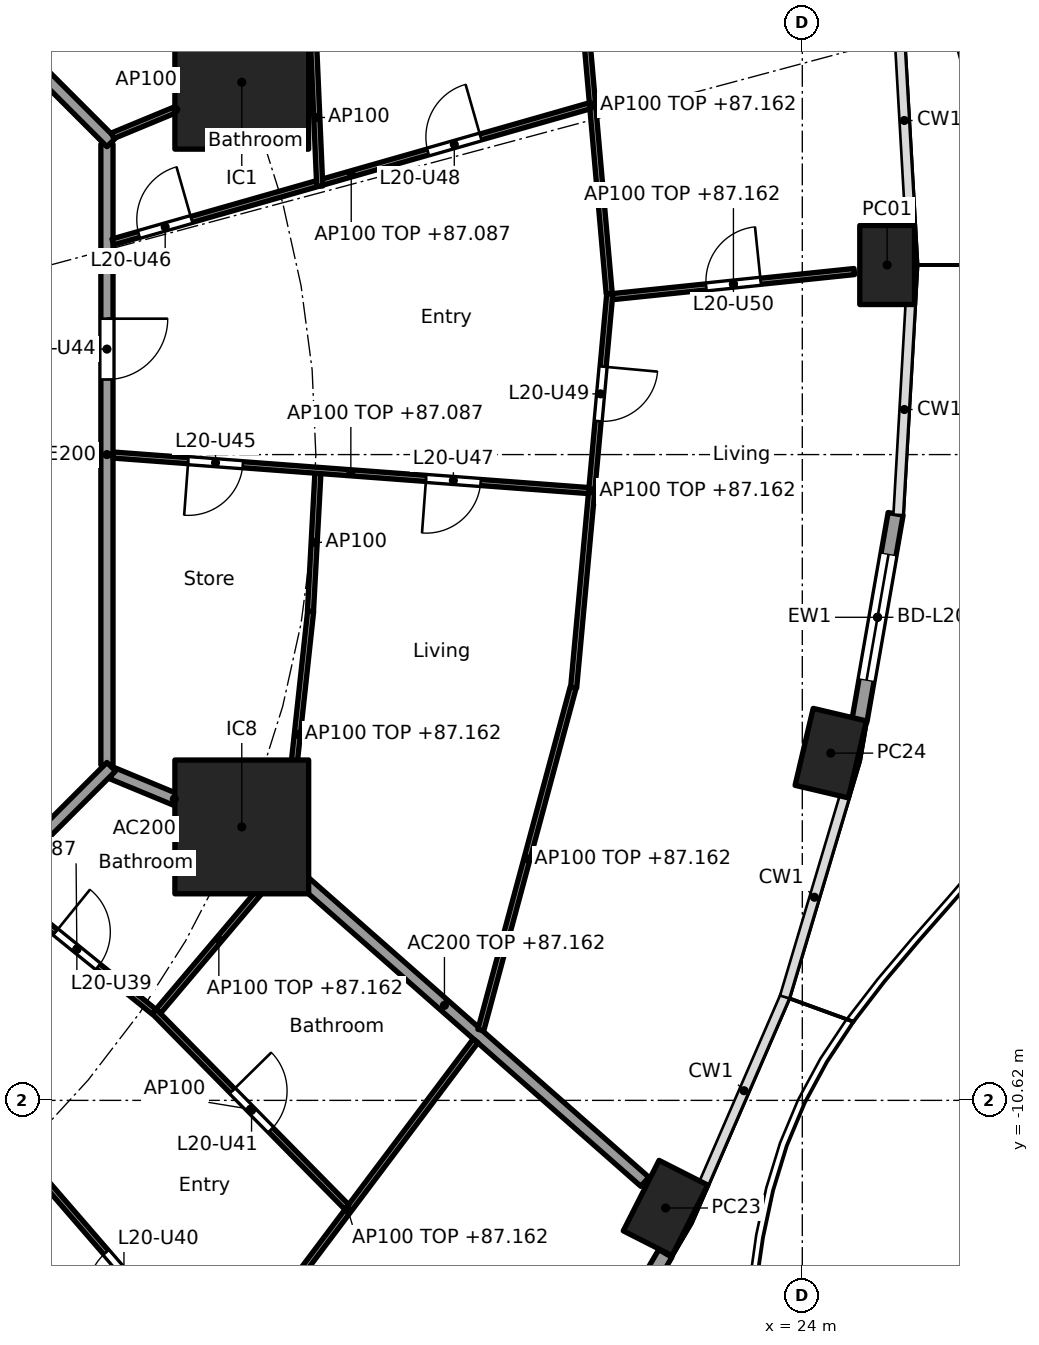
"""IFC4 building model, lengths in metres.
Left out: names, types, materials, properties, quantities, classifications, styles, units other than length and angle.
Written with IfcOpenShell. Run it as: python <this file> out.ifc"""

import sys

from ifc_helpers import new_model, si_unit, direction, frame, frame_2d, origin, origin_2d, place, context, subcontext, project, spatial, rectangle, hollow_rectangle, extrude, element, fill, save


model = new_model("IFC4")
c1 = context("Model", 3, precision=1e-05, world=origin(), true_north=direction((0.0, 1.0)))
c2 = subcontext(c1, "Body", "Model", "MODEL_VIEW")
j1 = project(units=[si_unit("LENGTHUNIT", "METRE"), si_unit("PLANEANGLEUNIT", "RADIAN")], contexts=[c1])
p1 = place(None, origin())
s1 = spatial("IfcSite", under=j1, at=p1, CompositionType="ELEMENT")
p2 = place(p1, origin())
s2 = spatial("IfcBuilding", under=s1, at=p2, CompositionType="ELEMENT")
p3 = place(p2, frame((0.0, 0.0, 84.4)))
s3 = spatial("IfcBuildingStorey", under=s2, at=p3, CompositionType="ELEMENT", Elevation=84.4)
for number, where, z_axis, x_axis in (
    (1, (25.395, 3.118, 0.0), (0.0, 0.0, 1.0), (0.0, 1.0, 0.0)),
    (2, (21.751, -12.39, 0.0), (0.0, 0.0, 1.0), (0.452, 0.892, 0.0)),
    (3, (24.468, -4.91, 0.0), (0.0, 0.0, 1.0), (0.229, 0.973, 0.0)),
):
    element("IfcColumn", number, at=place(p3, frame(where, z_axis=z_axis, x_axis=x_axis)), inside=s3, PredefinedType="COLUMN", context=c2, shape_type="SweptSolid", body=[
        extrude(hollow_rectangle(XDim=1.3, YDim=0.9, WallThickness=0.045, at=origin_2d()), origin(), (0.0, 0.0, 1.0), 3.7),
    ])
for number, where, z_axis, x_axis in (
    (4, (14.782, 6.123, 0.0), (0.0, 0.0, 1.0), (1.0, 0.0, 0.0)),
    (5, (14.782, -6.123, 0.0), (0.0, 0.0, 1.0), (1.0, 0.0, 0.0)),
):
    element("IfcColumn", number, at=place(p3, frame(where, z_axis=z_axis, x_axis=x_axis)), inside=s3, PredefinedType="COLUMN", context=c2, shape_type="SweptSolid", body=[
        extrude(rectangle(XDim=2.2, YDim=2.2, at=origin_2d()), origin(), (0.0, 0.0, 1.0), 3.7),
    ])
p4 = place(p3, frame((21.748, -13.137, 0.0), z_axis=(0.0, 0.0, 1.0), x_axis=(-0.506297921217, -0.862358634775, 0.0)))
e6 = element("IfcWall", 6, at=p4, inside=s3, PredefinedType="SOLIDWALL", context=c2, shape_type="SweptSolid", body=[
    extrude(rectangle(XDim=3.325, YDim=0.25, at=frame_2d((1.662, 0.0))), origin(), (0.0, 0.0, 1.0), 3.44),
])
p5 = place(p4, frame((0.612, 0.0, 0.0)))
e7 = element("IfcOpeningElement", 7, at=p5, cuts=e6, PredefinedType="OPENING", context=c2, shape_type="SweptSolid", body=[
    extrude(rectangle(XDim=2.1, YDim=2.4, at=frame_2d((1.05, 1.2))), frame((0.0, 0.135, 0.0), z_axis=(0.0, -1.0, 0.0), x_axis=(1.0, 0.0, 0.0)), (0.0, 0.0, 1.0), 0.27),
])
p6 = place(p3, frame((25.535, -0.974, 0.0), z_axis=(0.0, 0.0, 1.0), x_axis=(-0.172164316671, -0.985068245385, 0.0)))
e8 = element("IfcWall", 8, at=p6, inside=s3, PredefinedType="SOLIDWALL", context=c2, shape_type="SweptSolid", body=[
    extrude(rectangle(XDim=3.454, YDim=0.25, at=frame_2d((1.727, 0.0))), origin(), (0.0, 0.0, 1.0), 3.44),
])
p7 = place(p6, frame((0.677, 0.0, 0.0)))
e9 = element("IfcOpeningElement", 9, at=p7, cuts=e8, PredefinedType="OPENING", context=c2, shape_type="SweptSolid", body=[
    extrude(rectangle(XDim=2.1, YDim=2.4, at=frame_2d((1.05, 1.2))), frame((0.0, 0.135, 0.0), z_axis=(0.0, -1.0, 0.0), x_axis=(1.0, 0.0, 0.0)), (0.0, 0.0, 1.0), 0.27),
])
p8 = place(p3, frame((12.657, -5.243, 0.0), z_axis=(0.0, 0.0, 1.0), x_axis=(0.923876145736, -0.382691608661, 0.0)))
e10 = element("IfcWall", 10, at=p8, inside=s3, PredefinedType="PARTITIONING", context=c2, shape_type="SweptSolid", body=[
    extrude(rectangle(XDim=2.2, YDim=0.2, at=frame_2d((1.1, 0.0))), origin(), (0.0, 0.0, 1.0), 3.44),
])
p9 = place(p3, frame((14.82, -6.156, 0.0), z_axis=(0.0, 0.0, 1.0), x_axis=(0.750582231659, -0.660777052808, 0.0)))
e11 = element("IfcWall", 11, at=p9, inside=s3, PredefinedType="PARTITIONING", context=c2, shape_type="SweptSolid", body=[
    extrude(rectangle(XDim=8.781, YDim=0.2, at=frame_2d((4.391, 0.0))), origin(), (0.0, 0.0, 1.0), 2.762),
])
p10 = place(p3, frame((12.565, -5.104, 0.0), z_axis=(0.0, 0.0, 1.0), x_axis=(0.0, 1.0, 0.0)))
e12 = element("IfcWall", 12, at=p10, inside=s3, PredefinedType="PARTITIONING", context=c2, shape_type="SweptSolid", body=[
    extrude(rectangle(XDim=10.209, YDim=0.2, at=frame_2d((5.104, 0.0))), origin(), (0.0, 0.0, 1.0), 3.44),
])
p11 = place(p10, frame((6.339, 0.0, 0.0)))
e13 = element("IfcOpeningElement", 13, at=p11, cuts=e12, PredefinedType="OPENING", context=c2, shape_type="SweptSolid", body=[
    extrude(rectangle(XDim=1.0, YDim=2.1, at=frame_2d((0.5, 1.05))), frame((0.0, 0.11, 0.0), z_axis=(0.0, -1.0, 0.0), x_axis=(1.0, 0.0, 0.0)), (0.0, 0.0, 1.0), 0.22),
])
p12 = place(p3, frame((12.635, 5.134, 0.0), z_axis=(0.0, 0.0, 1.0), x_axis=(-0.707106781187, 0.707106781187, 0.0)))
e14 = element("IfcWall", 14, at=p12, inside=s3, PredefinedType="PARTITIONING", context=c2, shape_type="SweptSolid", body=[
    extrude(rectangle(XDim=10.609, YDim=0.2, at=frame_2d((5.305, 0.0))), origin(), (0.0, 0.0, 1.0), 3.44),
])
p13 = place(p3, frame((5.275, -12.494, 0.0), z_axis=(0.0, 0.0, 1.0), x_axis=(0.707106781187, 0.707106781187, 0.0)))
e15 = element("IfcWall", 15, at=p13, inside=s3, PredefinedType="PARTITIONING", context=c2, shape_type="SweptSolid", body=[
    extrude(rectangle(XDim=10.409, YDim=0.2, at=frame_2d((5.205, 0.0))), origin(), (0.0, 0.0, 1.0), 3.44),
])
p14 = place(p13, frame((5.906, 0.0, 0.0)))
e16 = element("IfcOpeningElement", 16, at=p14, cuts=e15, PredefinedType="OPENING", context=c2, shape_type="SweptSolid", body=[
    extrude(rectangle(XDim=1.0, YDim=2.1, at=frame_2d((0.5, 1.05))), frame((0.0, 0.11, 0.0), z_axis=(0.0, -1.0, 0.0), x_axis=(1.0, 0.0, 0.0)), (0.0, 0.0, 1.0), 0.22),
])
p15 = place(p3, frame((20.879, 2.597, 0.0), z_axis=(0.0, 0.0, 1.0), x_axis=(0.994666546694, 0.103142914868, 0.0)))
e17 = element("IfcWall", 17, at=p15, inside=s3, PredefinedType="PARTITIONING", context=c2, shape_type="SweptSolid", body=[
    extrude(rectangle(XDim=3.998, YDim=0.1, at=frame_2d((1.999, 0.0))), origin(), (0.0, 0.0, 1.0), 2.762),
])
p16 = place(p15, frame((1.549, 0.0, 0.0)))
e18 = element("IfcOpeningElement", 18, at=p16, cuts=e17, PredefinedType="OPENING", context=c2, shape_type="SweptSolid", body=[
    extrude(rectangle(XDim=0.9, YDim=2.1, at=frame_2d((0.45, 1.05))), frame((0.0, 0.06, 0.0), z_axis=(0.0, -1.0, 0.0), x_axis=(1.0, 0.0, 0.0)), (0.0, 0.0, 1.0), 0.12),
])
p17 = place(p3, frame((20.825, 2.642, 0.0), z_axis=(0.0, 0.0, 1.0), x_axis=(-0.08776129045, 0.99614153407, 0.0)))
e19 = element("IfcWall", 19, at=p17, inside=s3, PredefinedType="PARTITIONING", context=c2, shape_type="SweptSolid", body=[
    extrude(rectangle(XDim=6.237, YDim=0.1, at=frame_2d((3.119, 0.0))), origin(), (0.0, 0.0, 1.0), 2.762),
])
p18 = place(p3, frame((20.834, 2.642, 0.0), z_axis=(0.0, 0.0, 1.0), x_axis=(-0.091385407685, -0.995815599025, 0.0)))
e20 = element("IfcWall", 20, at=p18, inside=s3, PredefinedType="PARTITIONING", context=c2, shape_type="SweptSolid", body=[
    extrude(rectangle(XDim=6.502, YDim=0.1, at=frame_2d((3.251, 0.0))), origin(), (0.0, 0.0, 1.0), 2.762),
])
p19 = place(p18, frame((1.201, 0.0, 0.0)))
e21 = element("IfcOpeningElement", 21, at=p19, cuts=e20, PredefinedType="OPENING", context=c2, shape_type="SweptSolid", body=[
    extrude(rectangle(XDim=0.9, YDim=2.1, at=frame_2d((0.45, 1.05))), frame((0.0, 0.06, 0.0), z_axis=(0.0, -1.0, 0.0), x_axis=(1.0, 0.0, 0.0)), (0.0, 0.0, 1.0), 0.12),
])
p20 = place(p3, frame((12.661, 3.497, 0.0), z_axis=(0.0, 0.0, 1.0), x_axis=(0.961626678623, 0.274361314621, 0.0)))
e22 = element("IfcWall", 22, at=p20, inside=s3, PredefinedType="PARTITIONING", context=c2, shape_type="SweptSolid", body=[
    extrude(rectangle(XDim=8.156, YDim=0.1, at=frame_2d((4.078, 0.0))), origin(), (0.0, 0.0, 1.0), 2.687),
])
p21 = place(p20, frame((0.446, 0.0, 0.0)))
e23 = element("IfcOpeningElement", 23, at=p21, cuts=e22, PredefinedType="OPENING", context=c2, shape_type="SweptSolid", body=[
    extrude(rectangle(XDim=0.9, YDim=2.1, at=frame_2d((0.45, 1.05))), frame((0.0, 0.06, 0.0), z_axis=(0.0, -1.0, 0.0), x_axis=(1.0, 0.0, 0.0)), (0.0, 0.0, 1.0), 0.12),
])
p22 = place(p20, frame((5.39, 0.0, 0.0)))
e24 = element("IfcOpeningElement", 24, at=p22, cuts=e22, PredefinedType="OPENING", context=c2, shape_type="SweptSolid", body=[
    extrude(rectangle(XDim=0.9, YDim=2.1, at=frame_2d((0.45, 1.05))), frame((0.0, 0.06, 0.0), z_axis=(0.0, -1.0, 0.0), x_axis=(1.0, 0.0, 0.0)), (0.0, 0.0, 1.0), 0.12),
])
p23 = place(p3, frame((16.064, 4.415, 0.0), z_axis=(0.0, 0.0, 1.0), x_axis=(-0.043118325477, 0.999069972528, 0.0)))
e25 = element("IfcWall", 25, at=p23, inside=s3, PredefinedType="PARTITIONING", context=c2, shape_type="SweptSolid", body=[
    extrude(rectangle(XDim=2.259, YDim=0.1, at=frame_2d((1.13, 0.0))), origin(), (0.0, 0.0, 1.0), 3.44),
])
p24 = place(p3, frame((12.657, 5.243, 0.0), z_axis=(0.0, 0.0, 1.0), x_axis=(0.923848837015, 0.382757529444, 0.0)))
e26 = element("IfcWall", 26, at=p24, inside=s3, PredefinedType="PARTITIONING", context=c2, shape_type="SweptSolid", body=[
    extrude(rectangle(XDim=2.25, YDim=0.1, at=frame_2d((1.125, 0.0))), origin(), (0.0, 0.0, 1.0), 3.44),
])
p25 = place(p3, frame((14.827, 6.146, 0.0), z_axis=(0.0, 0.0, 1.0), x_axis=(0.892068075337, 0.451901038906, 0.0)))
e27 = element("IfcWall", 27, at=p25, inside=s3, PredefinedType="PARTITIONING", context=c2, shape_type="SweptSolid", body=[
    extrude(rectangle(XDim=10.32, YDim=0.1, at=frame_2d((5.16, 0.0))), origin(), (0.0, 0.0, 1.0), 2.762),
])
p26 = place(p25, frame((7.763, 0.0, 0.0)))
e28 = element("IfcOpeningElement", 28, at=p26, cuts=e27, PredefinedType="OPENING", context=c2, shape_type="SweptSolid", body=[
    extrude(rectangle(XDim=0.9, YDim=2.1, at=frame_2d((0.45, 1.05))), frame((0.0, 0.06, 0.0), z_axis=(0.0, -1.0, 0.0), x_axis=(1.0, 0.0, 0.0)), (0.0, 0.0, 1.0), 0.12),
])
p27 = place(p3, frame((8.95, -8.96, 0.0), z_axis=(0.0, 0.0, 1.0), x_axis=(0.65441081073, -0.756139200676, 0.0)))
e29 = element("IfcWall", 29, at=p27, inside=s3, PredefinedType="PARTITIONING", context=c2, shape_type="SweptSolid", body=[
    extrude(rectangle(XDim=12.451, YDim=0.1, at=frame_2d((6.226, 0.0))), origin(), (0.0, 0.0, 1.0), 2.687),
])
p28 = place(p27, frame((1.336, 0.0, 0.0)))
e30 = element("IfcOpeningElement", 30, at=p28, cuts=e29, PredefinedType="OPENING", context=c2, shape_type="SweptSolid", body=[
    extrude(rectangle(XDim=0.9, YDim=2.1, at=frame_2d((0.45, 1.05))), frame((0.0, 0.06, 0.0), z_axis=(0.0, -1.0, 0.0), x_axis=(1.0, 0.0, 0.0)), (0.0, 0.0, 1.0), 0.12),
])
p29 = place(p27, frame((5.501, 0.0, 0.0)))
e31 = element("IfcOpeningElement", 31, at=p29, cuts=e29, PredefinedType="OPENING", context=c2, shape_type="SweptSolid", body=[
    extrude(rectangle(XDim=0.9, YDim=2.1, at=frame_2d((0.45, 1.05))), frame((0.0, 0.06, 0.0), z_axis=(0.0, -1.0, 0.0), x_axis=(1.0, 0.0, 0.0)), (0.0, 0.0, 1.0), 0.12),
])
p30 = place(p27, frame((9.941, 0.0, 0.0)))
e32 = element("IfcOpeningElement", 32, at=p30, cuts=e29, PredefinedType="OPENING", context=c2, shape_type="SweptSolid", body=[
    extrude(rectangle(XDim=0.9, YDim=2.1, at=frame_2d((0.45, 1.05))), frame((0.0, 0.06, 0.0), z_axis=(0.0, -1.0, 0.0), x_axis=(1.0, 0.0, 0.0)), (0.0, 0.0, 1.0), 0.12),
])
p31 = place(p3, frame((14.432, -15.219, 0.0), z_axis=(0.0, 0.0, 1.0), x_axis=(0.601001256685, 0.799248077548, 0.0)))
e33 = element("IfcWall", 33, at=p31, inside=s3, PredefinedType="PARTITIONING", context=c2, shape_type="SweptSolid", body=[
    extrude(rectangle(XDim=6.98, YDim=0.1, at=frame_2d((3.49, 0.0))), origin(), (0.0, 0.0, 1.0), 2.762),
])
p32 = place(p3, frame((10.802, -7.107, 0.0), z_axis=(0.0, 0.0, 1.0), x_axis=(0.776992142502, -0.62951029419, 0.0)))
e34 = element("IfcWall", 34, at=p32, inside=s3, PredefinedType="PARTITIONING", context=c2, shape_type="SweptSolid", body=[
    extrude(rectangle(XDim=3.263, YDim=0.1, at=frame_2d((1.631, 0.0))), origin(), (0.0, 0.0, 1.0), 2.687),
])
p33 = place(p32, frame((1.181, 0.0, 0.0)))
e35 = element("IfcOpeningElement", 35, at=p33, cuts=e34, PredefinedType="OPENING", context=c2, shape_type="SweptSolid", body=[
    extrude(rectangle(XDim=0.9, YDim=2.1, at=frame_2d((0.45, 1.05))), frame((0.0, 0.06, 0.0), z_axis=(0.0, -1.0, 0.0), x_axis=(1.0, 0.0, 0.0)), (0.0, 0.0, 1.0), 0.12),
])
p34 = place(p3, frame((13.341, -9.157, 0.0), z_axis=(0.0, 0.0, 1.0), x_axis=(0.701624526877, -0.712546856904, 0.0)))
e36 = element("IfcWall", 36, at=p34, inside=s3, PredefinedType="PARTITIONING", context=c2, shape_type="SweptSolid", body=[
    extrude(rectangle(XDim=4.515, YDim=0.1, at=frame_2d((2.258, 0.0))), origin(), (0.0, 0.0, 1.0), 3.44),
])
p35 = place(p34, frame((1.833, 0.0, 0.0)))
e37 = element("IfcOpeningElement", 37, at=p35, cuts=e36, PredefinedType="OPENING", context=c2, shape_type="SweptSolid", body=[
    extrude(rectangle(XDim=0.9, YDim=2.1, at=frame_2d((0.45, 1.05))), frame((0.0, 0.06, 0.0), z_axis=(0.0, -1.0, 0.0), x_axis=(1.0, 0.0, 0.0)), (0.0, 0.0, 1.0), 0.12),
])
p36 = place(p3, frame((13.409, -9.155, 0.0), z_axis=(0.0, 0.0, 1.0), x_axis=(0.646130325831, 0.763227097293, 0.0)))
e38 = element("IfcWall", 38, at=p36, inside=s3, PredefinedType="PARTITIONING", context=c2, shape_type="SweptSolid", body=[
    extrude(rectangle(XDim=3.084, YDim=0.1, at=frame_2d((1.542, 0.0))), origin(), (0.0, 0.0, 1.0), 2.762),
])
p37 = place(p3, frame((15.477, -6.625, 0.0), z_axis=(0.0, 0.0, 1.0), x_axis=(0.107561928907, 0.994198386365, 0.0)))
e39 = element("IfcWall", 39, at=p37, inside=s3, PredefinedType="PARTITIONING", context=c2, shape_type="SweptSolid", body=[
    extrude(rectangle(XDim=4.072, YDim=0.1, at=frame_2d((2.036, 0.0))), origin(), (0.0, 0.0, 1.0), 2.762),
])
p38 = place(p3, frame((18.713, -9.464, 0.0), z_axis=(0.0, 0.0, 1.0), x_axis=(0.260279646259, 0.965533275316, 0.0)))
e40 = element("IfcWall", 40, at=p38, inside=s3, PredefinedType="PARTITIONING", context=c2, shape_type="SweptSolid", body=[
    extrude(rectangle(XDim=5.833, YDim=0.1, at=frame_2d((2.917, 0.0))), origin(), (0.0, 0.0, 1.0), 2.762),
])
p39 = place(p3, frame((15.912, -2.577, 0.0), z_axis=(0.0, 0.0, 1.0), x_axis=(0.053749298185, 0.998554461682, 0.0)))
e41 = element("IfcWall", 41, at=p39, inside=s3, PredefinedType="PARTITIONING", context=c2, shape_type="SweptSolid", body=[
    extrude(rectangle(XDim=2.271, YDim=0.1, at=frame_2d((1.135, 0.0))), origin(), (0.0, 0.0, 1.0), 3.44),
])
p40 = place(p3, frame((12.665, -0.008, 0.0), z_axis=(0.0, 0.0, 1.0), x_axis=(0.997222647159, -0.074478130978, 0.0)))
e42 = element("IfcWall", 42, at=p40, inside=s3, PredefinedType="PARTITIONING", context=c2, shape_type="SweptSolid", body=[
    extrude(rectangle(XDim=7.844, YDim=0.1, at=frame_2d((3.922, 0.0))), origin(), (0.0, 0.0, 1.0), 2.687),
])
p41 = place(p40, frame((1.241, 0.0, 0.0)))
e43 = element("IfcOpeningElement", 43, at=p41, cuts=e42, PredefinedType="OPENING", context=c2, shape_type="SweptSolid", body=[
    extrude(rectangle(XDim=0.9, YDim=2.1, at=frame_2d((0.45, 1.05))), frame((0.0, 0.06, 0.0), z_axis=(0.0, -1.0, 0.0), x_axis=(1.0, 0.0, 0.0)), (0.0, 0.0, 1.0), 0.12),
])
p42 = place(p40, frame((5.163, 0.0, 0.0)))
e44 = element("IfcOpeningElement", 44, at=p42, cuts=e42, PredefinedType="OPENING", context=c2, shape_type="SweptSolid", body=[
    extrude(rectangle(XDim=0.9, YDim=2.1, at=frame_2d((0.45, 1.05))), frame((0.0, 0.06, 0.0), z_axis=(0.0, -1.0, 0.0), x_axis=(1.0, 0.0, 0.0)), (0.0, 0.0, 1.0), 0.12),
])
p43 = place(p7, origin())
e45 = element("IfcDoor", 45, at=p43, inside=s3, OperationType="SLIDING_TO_LEFT", PredefinedType="DOOR", context=c2, shape_type="SweptSolid", body=[
    extrude(rectangle(XDim=2.1, YDim=2.4, at=frame_2d((1.05, 1.2))), frame((0.0, 0.025, 0.0), z_axis=(0.0, -1.0, 0.0), x_axis=(1.0, 0.0, 0.0)), (0.0, 0.0, 1.0), 0.05),
])
fill(e9, e45)
p44 = place(p33, origin())
e46 = element("IfcDoor", 46, at=p44, inside=s3, OperationType="SINGLE_SWING_LEFT", PredefinedType="DOOR", context=c2, shape_type="SweptSolid", body=[
    extrude(rectangle(XDim=0.9, YDim=2.1, at=frame_2d((0.45, 1.05))), frame((0.0, 0.025, 0.0), z_axis=(0.0, -1.0, 0.0), x_axis=(1.0, 0.0, 0.0)), (0.0, 0.0, 1.0), 0.05),
])
fill(e35, e46)
p45 = place(p29, frame((0.9, 0.0, 0.0), x_axis=(-1.0, 0.0, 0.0)))
e47 = element("IfcDoor", 47, at=p45, inside=s3, OperationType="SINGLE_SWING_LEFT", PredefinedType="DOOR", context=c2, shape_type="SweptSolid", body=[
    extrude(rectangle(XDim=0.9, YDim=2.1, at=frame_2d((0.45, 1.05))), frame((0.0, 0.025, 0.0), z_axis=(0.0, -1.0, 0.0), x_axis=(1.0, 0.0, 0.0)), (0.0, 0.0, 1.0), 0.05),
])
fill(e31, e47)
p46 = place(p35, origin())
e48 = element("IfcDoor", 48, at=p46, inside=s3, OperationType="SINGLE_SWING_LEFT", PredefinedType="DOOR", context=c2, shape_type="SweptSolid", body=[
    extrude(rectangle(XDim=0.9, YDim=2.1, at=frame_2d((0.45, 1.05))), frame((0.0, 0.025, 0.0), z_axis=(0.0, -1.0, 0.0), x_axis=(1.0, 0.0, 0.0)), (0.0, 0.0, 1.0), 0.05),
])
fill(e37, e48)
p47 = place(p11, frame((1.0, 0.0, 0.0), x_axis=(-1.0, 0.0, 0.0)))
e49 = element("IfcDoor", 49, at=p47, inside=s3, OperationType="SINGLE_SWING_LEFT", PredefinedType="DOOR", context=c2, shape_type="SweptSolid", body=[
    extrude(rectangle(XDim=1.0, YDim=2.1, at=frame_2d((0.5, 1.05))), frame((0.0, 0.025, 0.0), z_axis=(0.0, -1.0, 0.0), x_axis=(1.0, 0.0, 0.0)), (0.0, 0.0, 1.0), 0.05),
])
fill(e13, e49)
p48 = place(p41, frame((0.9, 0.0, 0.0), x_axis=(-1.0, 0.0, 0.0)))
e50 = element("IfcDoor", 50, at=p48, inside=s3, OperationType="SINGLE_SWING_RIGHT", PredefinedType="DOOR", context=c2, shape_type="SweptSolid", body=[
    extrude(rectangle(XDim=0.9, YDim=2.1, at=frame_2d((0.45, 1.05))), frame((0.0, 0.025, 0.0), z_axis=(0.0, -1.0, 0.0), x_axis=(1.0, 0.0, 0.0)), (0.0, 0.0, 1.0), 0.05),
])
fill(e43, e50)
p49 = place(p21, origin())
e51 = element("IfcDoor", 51, at=p49, inside=s3, OperationType="SINGLE_SWING_RIGHT", PredefinedType="DOOR", context=c2, shape_type="SweptSolid", body=[
    extrude(rectangle(XDim=0.9, YDim=2.1, at=frame_2d((0.45, 1.05))), frame((0.0, 0.025, 0.0), z_axis=(0.0, -1.0, 0.0), x_axis=(1.0, 0.0, 0.0)), (0.0, 0.0, 1.0), 0.05),
])
fill(e23, e51)
p50 = place(p42, frame((0.9, 0.0, 0.0), x_axis=(-1.0, 0.0, 0.0)))
e52 = element("IfcDoor", 52, at=p50, inside=s3, OperationType="SINGLE_SWING_RIGHT", PredefinedType="DOOR", context=c2, shape_type="SweptSolid", body=[
    extrude(rectangle(XDim=0.9, YDim=2.1, at=frame_2d((0.45, 1.05))), frame((0.0, 0.025, 0.0), z_axis=(0.0, -1.0, 0.0), x_axis=(1.0, 0.0, 0.0)), (0.0, 0.0, 1.0), 0.05),
])
fill(e44, e52)
p51 = place(p22, origin())
e53 = element("IfcDoor", 53, at=p51, inside=s3, OperationType="SINGLE_SWING_RIGHT", PredefinedType="DOOR", context=c2, shape_type="SweptSolid", body=[
    extrude(rectangle(XDim=0.9, YDim=2.1, at=frame_2d((0.45, 1.05))), frame((0.0, 0.025, 0.0), z_axis=(0.0, -1.0, 0.0), x_axis=(1.0, 0.0, 0.0)), (0.0, 0.0, 1.0), 0.05),
])
fill(e24, e53)
p52 = place(p19, origin())
e54 = element("IfcDoor", 54, at=p52, inside=s3, OperationType="SINGLE_SWING_LEFT", PredefinedType="DOOR", context=c2, shape_type="SweptSolid", body=[
    extrude(rectangle(XDim=0.9, YDim=2.1, at=frame_2d((0.45, 1.05))), frame((0.0, 0.025, 0.0), z_axis=(0.0, -1.0, 0.0), x_axis=(1.0, 0.0, 0.0)), (0.0, 0.0, 1.0), 0.05),
])
fill(e21, e54)
p53 = place(p16, origin())
e55 = element("IfcDoor", 55, at=p53, inside=s3, OperationType="SINGLE_SWING_RIGHT", PredefinedType="DOOR", context=c2, shape_type="SweptSolid", body=[
    extrude(rectangle(XDim=0.9, YDim=2.1, at=frame_2d((0.45, 1.05))), frame((0.0, 0.025, 0.0), z_axis=(0.0, -1.0, 0.0), x_axis=(1.0, 0.0, 0.0)), (0.0, 0.0, 1.0), 0.05),
])
fill(e18, e55)
save(model, sys.argv[1])
